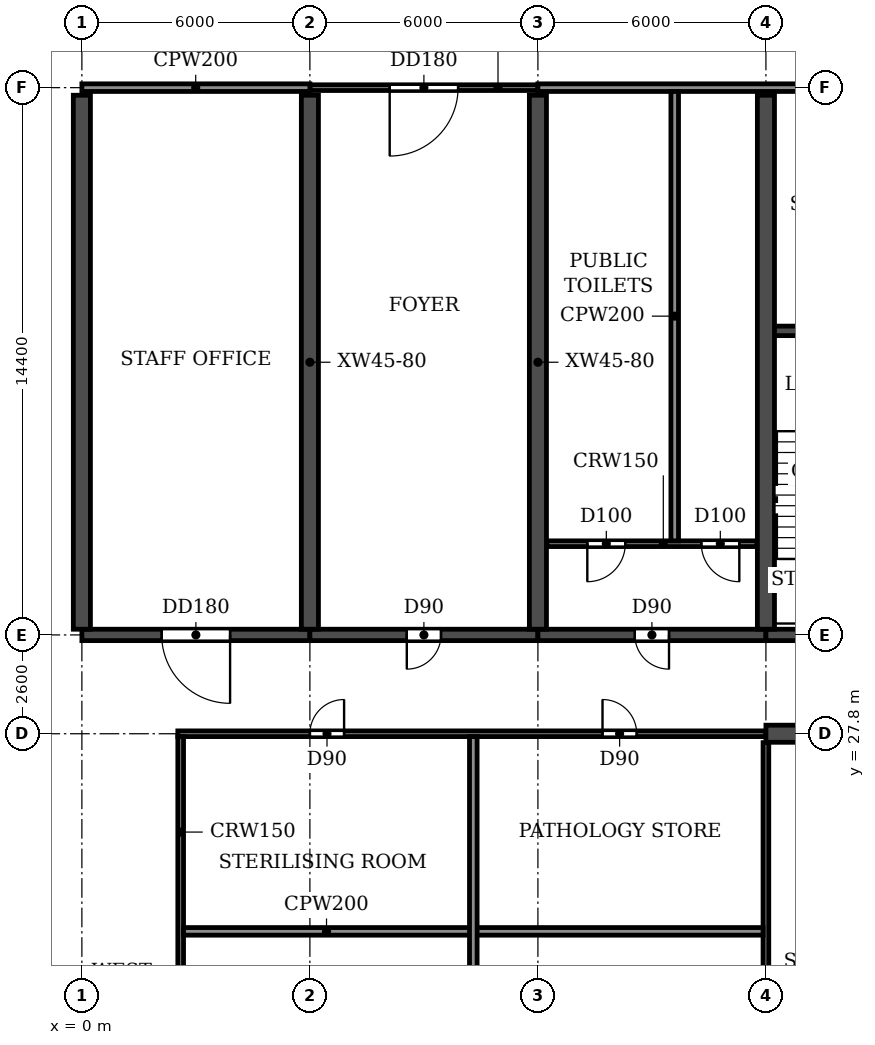
"""IFC4 building model, lengths in metres.
Left out: names, types, materials, properties, quantities, classifications, styles, units other than length and angle.
Written with IfcOpenShell. Run it as: python <this file> out.ifc"""

import sys

from ifc_helpers import new_model, si_unit, direction, frame, frame_2d, origin, place, context, subcontext, project, spatial, rectangle, extrude, element, fill, save


model = new_model("IFC4")
c1 = context("Model", 3, precision=1e-05, world=origin(), true_north=direction((0.0, 1.0)))
c2 = subcontext(c1, "Body", "Model", "MODEL_VIEW")
j1 = project(units=[si_unit("LENGTHUNIT", "METRE"), si_unit("PLANEANGLEUNIT", "RADIAN")], contexts=[c1])
p1 = place(None, origin())
s1 = spatial("IfcSite", under=j1, at=p1, CompositionType="ELEMENT")
p2 = place(p1, origin())
s2 = spatial("IfcBuilding", under=s1, at=p2, CompositionType="ELEMENT")
p3 = place(p2, frame((0.0, 0.0, 6.0)))
s3 = spatial("IfcBuildingStorey", under=s2, at=p3, CompositionType="ELEMENT", Elevation=6.0)
for number, where, z_axis, x_axis in (
    (1, (0.0, 30.55, 0.0), (0.0, 0.0, 1.0), (0.0, 1.0, 0.0)),
    (2, (6.0, 30.55, 0.0), (0.0, 0.0, 1.0), (0.0, 1.0, 0.0)),
    (3, (12.0, 30.55, 0.0), (0.0, 0.0, 1.0), (0.0, 1.0, 0.0)),
    (4, (18.0, 30.55, 0.0), (0.0, 0.0, 1.0), (0.0, 1.0, 0.0)),
):
    element("IfcWall", number, at=place(p3, frame(where, z_axis=z_axis, x_axis=x_axis)), inside=s3, PredefinedType="SHEAR", context=c2, shape_type="SweptSolid", body=[
        extrude(rectangle(XDim=14.05, YDim=0.45, at=frame_2d((7.025, 0.0))), origin(), (0.0, 0.0, 1.0), 4.52),
    ])
p4 = place(p3, frame((0.0, 30.4, 0.0), z_axis=(0.0, 0.0, 1.0), x_axis=(1.0, 0.0, 0.0)))
e5 = element("IfcWall", 5, at=p4, inside=s3, PredefinedType="SHEAR", context=c2, shape_type="SweptSolid", body=[
    extrude(rectangle(XDim=6.0, YDim=0.3, at=frame_2d((3.0, 0.0))), origin(), (0.0, 0.0, 1.0), 3.92),
])
p5 = place(p4, frame((2.1, 0.0, 0.0)))
e6 = element("IfcOpeningElement", 6, at=p5, cuts=e5, PredefinedType="OPENING", context=c2, shape_type="SweptSolid", body=[
    extrude(rectangle(XDim=1.8, YDim=2.1, at=frame_2d((0.9, 1.05))), frame((0.0, 0.16, 0.0), z_axis=(0.0, -1.0, 0.0), x_axis=(1.0, 0.0, 0.0)), (0.0, 0.0, 1.0), 0.32),
])
p6 = place(p3, frame((6.0, 30.4, 0.0), z_axis=(0.0, 0.0, 1.0), x_axis=(1.0, 0.0, 0.0)))
e7 = element("IfcWall", 7, at=p6, inside=s3, PredefinedType="SHEAR", context=c2, shape_type="SweptSolid", body=[
    extrude(rectangle(XDim=6.0, YDim=0.3, at=frame_2d((3.0, 0.0))), origin(), (0.0, 0.0, 1.0), 3.92),
])
p7 = place(p6, frame((2.55, 0.0, 0.0)))
e8 = element("IfcOpeningElement", 8, at=p7, cuts=e7, PredefinedType="OPENING", context=c2, shape_type="SweptSolid", body=[
    extrude(rectangle(XDim=0.9, YDim=2.1, at=frame_2d((0.45, 1.05))), frame((0.0, 0.16, 0.0), z_axis=(0.0, -1.0, 0.0), x_axis=(1.0, 0.0, 0.0)), (0.0, 0.0, 1.0), 0.32),
])
p8 = place(p3, frame((12.0, 30.4, 0.0), z_axis=(0.0, 0.0, 1.0), x_axis=(1.0, 0.0, 0.0)))
e9 = element("IfcWall", 9, at=p8, inside=s3, PredefinedType="SHEAR", context=c2, shape_type="SweptSolid", body=[
    extrude(rectangle(XDim=6.0, YDim=0.3, at=frame_2d((3.0, 0.0))), origin(), (0.0, 0.0, 1.0), 3.92),
])
p9 = place(p8, frame((2.55, 0.0, 0.0)))
e10 = element("IfcOpeningElement", 10, at=p9, cuts=e9, PredefinedType="OPENING", context=c2, shape_type="SweptSolid", body=[
    extrude(rectangle(XDim=0.9, YDim=2.1, at=frame_2d((0.45, 1.05))), frame((0.0, 0.16, 0.0), z_axis=(0.0, -1.0, 0.0), x_axis=(1.0, 0.0, 0.0)), (0.0, 0.0, 1.0), 0.32),
])
p10 = place(p3, frame((18.0, 30.4, 0.0), z_axis=(0.0, 0.0, 1.0), x_axis=(1.0, 0.0, 0.0)))
e11 = element("IfcWall", 11, at=p10, inside=s3, PredefinedType="SHEAR", context=c2, shape_type="SweptSolid", body=[
    extrude(rectangle(XDim=6.0, YDim=0.3, at=frame_2d((3.0, 0.0))), origin(), (0.0, 0.0, 1.0), 3.92),
])
p11 = place(p10, frame((1.4, 0.0, 0.0)))
e12 = element("IfcOpeningElement", 12, at=p11, cuts=e11, PredefinedType="OPENING", context=c2, shape_type="SweptSolid", body=[
    extrude(rectangle(XDim=1.0, YDim=2.1, at=frame_2d((0.5, 1.05))), frame((0.0, 0.16, 0.0), z_axis=(0.0, -1.0, 0.0), x_axis=(1.0, 0.0, 0.0)), (0.0, 0.0, 1.0), 0.32),
])
p12 = place(p10, frame((4.45, 0.0, 0.0)))
e13 = element("IfcOpeningElement", 13, at=p12, cuts=e11, PredefinedType="OPENING", context=c2, shape_type="SweptSolid", body=[
    extrude(rectangle(XDim=0.9, YDim=2.1, at=frame_2d((0.45, 1.05))), frame((0.0, 0.16, 0.0), z_axis=(0.0, -1.0, 0.0), x_axis=(1.0, 0.0, 0.0)), (0.0, 0.0, 1.0), 0.32),
])
p13 = place(p3, frame((18.0, 27.8, 0.0), z_axis=(0.0, 0.0, 1.0), x_axis=(1.0, 0.0, 0.0)))
e14 = element("IfcWall", 14, at=p13, inside=s3, PredefinedType="SOLIDWALL", context=c2, shape_type="SweptSolid", body=[
    extrude(rectangle(XDim=66.0, YDim=0.45, at=frame_2d((33.0, 0.0))), origin(), (0.0, 0.0, 1.0), 4.52),
])
p14 = place(p13, frame((0.9, 0.0, 0.0)))
e15 = element("IfcOpeningElement", 15, at=p14, cuts=e14, PredefinedType="OPENING", context=c2, shape_type="SweptSolid", body=[
    extrude(rectangle(XDim=1.0, YDim=2.1, at=frame_2d((0.5, 1.05))), frame((0.0, 0.235, 0.0), z_axis=(0.0, -1.0, 0.0), x_axis=(1.0, 0.0, 0.0)), (0.0, 0.0, 1.0), 0.47),
])
p15 = place(p13, frame((4.25, 0.0, 0.0)))
e16 = element("IfcOpeningElement", 16, at=p15, cuts=e14, PredefinedType="OPENING", context=c2, shape_type="SweptSolid", body=[
    extrude(rectangle(XDim=0.9, YDim=2.1, at=frame_2d((0.45, 1.05))), frame((0.0, 0.235, 0.0), z_axis=(0.0, -1.0, 0.0), x_axis=(1.0, 0.0, 0.0)), (0.0, 0.0, 1.0), 0.47),
])
p16 = place(p13, frame((8.85, 0.0, 0.0)))
e17 = element("IfcOpeningElement", 17, at=p16, cuts=e14, PredefinedType="OPENING", context=c2, shape_type="SweptSolid", body=[
    extrude(rectangle(XDim=0.9, YDim=2.1, at=frame_2d((0.45, 1.05))), frame((0.0, 0.235, 0.0), z_axis=(0.0, -1.0, 0.0), x_axis=(1.0, 0.0, 0.0)), (0.0, 0.0, 1.0), 0.47),
])
p17 = place(p13, frame((13.45, 0.0, 0.0)))
e18 = element("IfcOpeningElement", 18, at=p17, cuts=e14, PredefinedType="OPENING", context=c2, shape_type="SweptSolid", body=[
    extrude(rectangle(XDim=0.9, YDim=2.1, at=frame_2d((0.45, 1.05))), frame((0.0, 0.235, 0.0), z_axis=(0.0, -1.0, 0.0), x_axis=(1.0, 0.0, 0.0)), (0.0, 0.0, 1.0), 0.47),
])
p18 = place(p13, frame((17.9, 0.0, 0.0)))
e19 = element("IfcOpeningElement", 19, at=p18, cuts=e14, PredefinedType="OPENING", context=c2, shape_type="SweptSolid", body=[
    extrude(rectangle(XDim=1.0, YDim=2.1, at=frame_2d((0.5, 1.05))), frame((0.0, 0.235, 0.0), z_axis=(0.0, -1.0, 0.0), x_axis=(1.0, 0.0, 0.0)), (0.0, 0.0, 1.0), 0.47),
])
p19 = place(p13, frame((23.1, 0.0, 0.0)))
e20 = element("IfcOpeningElement", 20, at=p19, cuts=e14, PredefinedType="OPENING", context=c2, shape_type="SweptSolid", body=[
    extrude(rectangle(XDim=1.0, YDim=2.1, at=frame_2d((0.5, 1.05))), frame((0.0, 0.235, 0.0), z_axis=(0.0, -1.0, 0.0), x_axis=(1.0, 0.0, 0.0)), (0.0, 0.0, 1.0), 0.47),
])
p20 = place(p13, frame((29.6, 0.0, 0.0)))
e21 = element("IfcOpeningElement", 21, at=p20, cuts=e14, PredefinedType="OPENING", context=c2, shape_type="SweptSolid", body=[
    extrude(rectangle(XDim=1.0, YDim=2.1, at=frame_2d((0.5, 1.05))), frame((0.0, 0.235, 0.0), z_axis=(0.0, -1.0, 0.0), x_axis=(1.0, 0.0, 0.0)), (0.0, 0.0, 1.0), 0.47),
])
p21 = place(p13, frame((32.5, 0.0, 0.0)))
e22 = element("IfcOpeningElement", 22, at=p21, cuts=e14, PredefinedType="OPENING", context=c2, shape_type="SweptSolid", body=[
    extrude(rectangle(XDim=1.0, YDim=2.1, at=frame_2d((0.5, 1.05))), frame((0.0, 0.235, 0.0), z_axis=(0.0, -1.0, 0.0), x_axis=(1.0, 0.0, 0.0)), (0.0, 0.0, 1.0), 0.47),
])
p22 = place(p13, frame((38.0, 0.0, 0.0)))
e23 = element("IfcOpeningElement", 23, at=p22, cuts=e14, PredefinedType="OPENING", context=c2, shape_type="SweptSolid", body=[
    extrude(rectangle(XDim=1.0, YDim=2.1, at=frame_2d((0.5, 1.05))), frame((0.0, 0.235, 0.0), z_axis=(0.0, -1.0, 0.0), x_axis=(1.0, 0.0, 0.0)), (0.0, 0.0, 1.0), 0.47),
])
p23 = place(p13, frame((43.2, 0.0, 0.0)))
e24 = element("IfcOpeningElement", 24, at=p23, cuts=e14, PredefinedType="OPENING", context=c2, shape_type="SweptSolid", body=[
    extrude(rectangle(XDim=1.0, YDim=2.1, at=frame_2d((0.5, 1.05))), frame((0.0, 0.235, 0.0), z_axis=(0.0, -1.0, 0.0), x_axis=(1.0, 0.0, 0.0)), (0.0, 0.0, 1.0), 0.47),
])
p24 = place(p13, frame((45.8, 0.0, 0.0)))
e25 = element("IfcOpeningElement", 25, at=p24, cuts=e14, PredefinedType="OPENING", context=c2, shape_type="SweptSolid", body=[
    extrude(rectangle(XDim=1.0, YDim=2.1, at=frame_2d((0.5, 1.05))), frame((0.0, 0.235, 0.0), z_axis=(0.0, -1.0, 0.0), x_axis=(1.0, 0.0, 0.0)), (0.0, 0.0, 1.0), 0.47),
])
p25 = place(p13, frame((48.4, 0.0, 0.0)))
e26 = element("IfcOpeningElement", 26, at=p25, cuts=e14, PredefinedType="OPENING", context=c2, shape_type="SweptSolid", body=[
    extrude(rectangle(XDim=1.0, YDim=2.1, at=frame_2d((0.5, 1.05))), frame((0.0, 0.235, 0.0), z_axis=(0.0, -1.0, 0.0), x_axis=(1.0, 0.0, 0.0)), (0.0, 0.0, 1.0), 0.47),
])
p26 = place(p13, frame((51.65, 0.0, 0.0)))
e27 = element("IfcOpeningElement", 27, at=p26, cuts=e14, PredefinedType="OPENING", context=c2, shape_type="SweptSolid", body=[
    extrude(rectangle(XDim=0.9, YDim=2.1, at=frame_2d((0.45, 1.05))), frame((0.0, 0.235, 0.0), z_axis=(0.0, -1.0, 0.0), x_axis=(1.0, 0.0, 0.0)), (0.0, 0.0, 1.0), 0.47),
])
p27 = place(p13, frame((56.25, 0.0, 0.0)))
e28 = element("IfcOpeningElement", 28, at=p27, cuts=e14, PredefinedType="OPENING", context=c2, shape_type="SweptSolid", body=[
    extrude(rectangle(XDim=0.9, YDim=2.1, at=frame_2d((0.45, 1.05))), frame((0.0, 0.235, 0.0), z_axis=(0.0, -1.0, 0.0), x_axis=(1.0, 0.0, 0.0)), (0.0, 0.0, 1.0), 0.47),
])
p28 = place(p13, frame((60.85, 0.0, 0.0)))
e29 = element("IfcOpeningElement", 29, at=p28, cuts=e14, PredefinedType="OPENING", context=c2, shape_type="SweptSolid", body=[
    extrude(rectangle(XDim=0.9, YDim=2.1, at=frame_2d((0.45, 1.05))), frame((0.0, 0.235, 0.0), z_axis=(0.0, -1.0, 0.0), x_axis=(1.0, 0.0, 0.0)), (0.0, 0.0, 1.0), 0.47),
])
p29 = place(p13, frame((64.1, 0.0, 0.0)))
e30 = element("IfcOpeningElement", 30, at=p29, cuts=e14, PredefinedType="OPENING", context=c2, shape_type="SweptSolid", body=[
    extrude(rectangle(XDim=1.0, YDim=2.1, at=frame_2d((0.5, 1.05))), frame((0.0, 0.235, 0.0), z_axis=(0.0, -1.0, 0.0), x_axis=(1.0, 0.0, 0.0)), (0.0, 0.0, 1.0), 0.47),
])
p30 = place(p3, frame((18.0, 38.4, 0.0), z_axis=(0.0, 0.0, 1.0), x_axis=(1.0, 0.0, 0.0)))
e31 = element("IfcWall", 31, at=p30, inside=s3, PredefinedType="SOLIDWALL", context=c2, shape_type="SweptSolid", body=[
    extrude(rectangle(XDim=3.925, YDim=0.25, at=frame_2d((1.962, 0.0))), origin(), (0.0, 0.0, 1.0), 4.52),
])
p31 = place(p3, frame((2.525, 27.8, 0.0), z_axis=(0.0, 0.0, 1.0), x_axis=(1.0, 0.0, 0.0)))
e32 = element("IfcWall", 32, at=p31, inside=s3, PredefinedType="PARTITIONING", context=c2, shape_type="SweptSolid", body=[
    extrude(rectangle(XDim=15.465, YDim=0.15, at=frame_2d((7.732, 0.0))), origin(), (0.0, 0.0, 1.0), 4.52),
])
p32 = place(p31, frame((3.475, 0.0, 0.0)))
e33 = element("IfcOpeningElement", 33, at=p32, cuts=e32, PredefinedType="OPENING", context=c2, shape_type="SweptSolid", body=[
    extrude(rectangle(XDim=0.9, YDim=2.1, at=frame_2d((0.45, 1.05))), frame((0.0, 0.085, 0.0), z_axis=(0.0, -1.0, 0.0), x_axis=(1.0, 0.0, 0.0)), (0.0, 0.0, 1.0), 0.17),
])
p33 = place(p31, frame((11.175, 0.0, 0.0)))
e34 = element("IfcOpeningElement", 34, at=p33, cuts=e32, PredefinedType="OPENING", context=c2, shape_type="SweptSolid", body=[
    extrude(rectangle(XDim=0.9, YDim=2.1, at=frame_2d((0.45, 1.05))), frame((0.0, 0.085, 0.0), z_axis=(0.0, -1.0, 0.0), x_axis=(1.0, 0.0, 0.0)), (0.0, 0.0, 1.0), 0.17),
])
p34 = place(p3, frame((12.235, 32.8, 0.0), z_axis=(0.0, 0.0, 1.0), x_axis=(1.0, 0.0, 0.0)))
e35 = element("IfcWall", 35, at=p34, inside=s3, PredefinedType="PARTITIONING", context=c2, shape_type="SweptSolid", body=[
    extrude(rectangle(XDim=5.53, YDim=0.15, at=frame_2d((2.765, 0.0))), origin(), (0.0, 0.0, 1.0), 4.52),
])
p35 = place(p34, frame((1.065, 0.0, 0.0)))
e36 = element("IfcOpeningElement", 36, at=p35, cuts=e35, PredefinedType="OPENING", context=c2, shape_type="SweptSolid", body=[
    extrude(rectangle(XDim=1.0, YDim=2.1, at=frame_2d((0.5, 1.05))), frame((0.0, 0.085, 0.0), z_axis=(0.0, -1.0, 0.0), x_axis=(1.0, 0.0, 0.0)), (0.0, 0.0, 1.0), 0.17),
])
p36 = place(p34, frame((4.065, 0.0, 0.0)))
e37 = element("IfcOpeningElement", 37, at=p36, cuts=e35, PredefinedType="OPENING", context=c2, shape_type="SweptSolid", body=[
    extrude(rectangle(XDim=1.0, YDim=2.1, at=frame_2d((0.5, 1.05))), frame((0.0, 0.085, 0.0), z_axis=(0.0, -1.0, 0.0), x_axis=(1.0, 0.0, 0.0)), (0.0, 0.0, 1.0), 0.17),
])
p37 = place(p3, frame((6.0, 44.8, 0.0), z_axis=(0.0, 0.0, 1.0), x_axis=(1.0, 0.0, 0.0)))
e38 = element("IfcWall", 38, at=p37, inside=s3, PredefinedType="PARTITIONING", context=c2, shape_type="SweptSolid", body=[
    extrude(rectangle(XDim=6.0, YDim=0.15, at=frame_2d((3.0, 0.0))), origin(), (0.0, 0.0, 1.0), 4.52),
])
p38 = place(p37, frame((2.1, 0.0, 0.0)))
e39 = element("IfcOpeningElement", 39, at=p38, cuts=e38, PredefinedType="OPENING", context=c2, shape_type="SweptSolid", body=[
    extrude(rectangle(XDim=1.8, YDim=2.1, at=frame_2d((0.9, 1.05))), frame((0.0, 0.085, 0.0), z_axis=(0.0, -1.0, 0.0), x_axis=(1.0, 0.0, 0.0)), (0.0, 0.0, 1.0), 0.17),
])
p39 = place(p3, frame((2.6, 14.675, 0.0), z_axis=(0.0, 0.0, 1.0), x_axis=(0.0, 1.0, 0.0)))
e40 = element("IfcWall", 40, at=p39, inside=s3, PredefinedType="PARTITIONING", context=c2, shape_type="SweptSolid", body=[
    extrude(rectangle(XDim=13.05, YDim=0.15, at=frame_2d((6.525, 0.0))), origin(), (0.0, 0.0, 1.0), 4.52),
])
p40 = place(p39, frame((3.025, 0.0, 0.0)))
e41 = element("IfcOpeningElement", 41, at=p40, cuts=e40, PredefinedType="OPENING", context=c2, shape_type="SweptSolid", body=[
    extrude(rectangle(XDim=1.8, YDim=2.1, at=frame_2d((0.9, 1.05))), frame((0.0, 0.085, 0.0), z_axis=(0.0, -1.0, 0.0), x_axis=(1.0, 0.0, 0.0)), (0.0, 0.0, 1.0), 0.17),
])
p41 = place(p3, frame((18.0, 14.835, 0.0), z_axis=(0.0, 0.0, 1.0), x_axis=(0.0, 1.0, 0.0)))
e42 = element("IfcWall", 42, at=p41, inside=s3, PredefinedType="PARTITIONING", context=c2, shape_type="SweptSolid", body=[
    extrude(rectangle(XDim=12.73, YDim=0.15, at=frame_2d((6.365, 0.0))), origin(), (0.0, 0.0, 1.0), 4.52),
])
p42 = place(p3, frame((2.675, 22.6, 0.0), z_axis=(0.0, 0.0, 1.0), x_axis=(1.0, 0.0, 0.0)))
e43 = element("IfcWall", 43, at=p42, inside=s3, PredefinedType="PARTITIONING", context=c2, shape_type="SweptSolid", body=[
    extrude(rectangle(XDim=15.25, YDim=0.2, at=frame_2d((7.625, 0.0))), origin(), (0.0, 0.0, 1.0), 4.52),
])
p43 = place(p3, frame((0.0, 44.8, 0.0), z_axis=(0.0, 0.0, 1.0), x_axis=(1.0, 0.0, 0.0)))
e44 = element("IfcWall", 44, at=p43, inside=s3, PredefinedType="PARTITIONING", context=c2, shape_type="SweptSolid", body=[
    extrude(rectangle(XDim=6.0, YDim=0.2, at=frame_2d((3.0, 0.0))), origin(), (0.0, 0.0, 1.0), 4.52),
])
p44 = place(p3, frame((12.0, 44.8, 0.0), z_axis=(0.0, 0.0, 1.0), x_axis=(1.0, 0.0, 0.0)))
e45 = element("IfcWall", 45, at=p44, inside=s3, PredefinedType="PARTITIONING", context=c2, shape_type="SweptSolid", body=[
    extrude(rectangle(XDim=18.0, YDim=0.2, at=frame_2d((9.0, 0.0))), origin(), (0.0, 0.0, 1.0), 4.52),
])
p45 = place(p3, frame((10.3, 14.675, 0.0), z_axis=(0.0, 0.0, 1.0), x_axis=(0.0, 1.0, 0.0)))
e46 = element("IfcWall", 46, at=p45, inside=s3, PredefinedType="PARTITIONING", context=c2, shape_type="SweptSolid", body=[
    extrude(rectangle(XDim=13.05, YDim=0.2, at=frame_2d((6.525, 0.0))), origin(), (0.0, 0.0, 1.0), 4.52),
])
p46 = place(p3, frame((15.6, 32.875, 0.0), z_axis=(0.0, 0.0, 1.0), x_axis=(0.0, 1.0, 0.0)))
e47 = element("IfcWall", 47, at=p46, inside=s3, PredefinedType="PARTITIONING", context=c2, shape_type="SweptSolid", body=[
    extrude(rectangle(XDim=11.825, YDim=0.2, at=frame_2d((5.913, 0.0))), origin(), (0.0, 0.0, 1.0), 4.52),
])
p47 = place(p5, frame((1.8, 0.0, 0.0), z_axis=(0.0, 0.0, 1.0), x_axis=(-1.0, 0.0, 0.0)))
e48 = element("IfcDoor", 48, at=p47, inside=s3, OperationType="DOUBLE_DOOR_SINGLE_SWING", PredefinedType="DOOR", context=c2, shape_type="SweptSolid", body=[
    extrude(rectangle(XDim=1.8, YDim=2.1, at=frame_2d((0.9, 1.05))), frame((0.0, 0.025, 0.0), z_axis=(0.0, -1.0, 0.0), x_axis=(1.0, 0.0, 0.0)), (0.0, 0.0, 1.0), 0.05),
])
fill(e6, e48)
p48 = place(p32, origin())
e49 = element("IfcDoor", 49, at=p48, inside=s3, OperationType="SINGLE_SWING_RIGHT", PredefinedType="DOOR", context=c2, shape_type="SweptSolid", body=[
    extrude(rectangle(XDim=0.9, YDim=2.1, at=frame_2d((0.45, 1.05))), frame((0.0, 0.025, 0.0), z_axis=(0.0, -1.0, 0.0), x_axis=(1.0, 0.0, 0.0)), (0.0, 0.0, 1.0), 0.05),
])
fill(e33, e49)
p49 = place(p7, frame((0.9, 0.0, 0.0), z_axis=(0.0, 0.0, 1.0), x_axis=(-1.0, 0.0, 0.0)))
e50 = element("IfcDoor", 50, at=p49, inside=s3, OperationType="SINGLE_SWING_RIGHT", PredefinedType="DOOR", context=c2, shape_type="SweptSolid", body=[
    extrude(rectangle(XDim=0.9, YDim=2.1, at=frame_2d((0.45, 1.05))), frame((0.0, 0.025, 0.0), z_axis=(0.0, -1.0, 0.0), x_axis=(1.0, 0.0, 0.0)), (0.0, 0.0, 1.0), 0.05),
])
fill(e8, e50)
p50 = place(p33, origin())
e51 = element("IfcDoor", 51, at=p50, inside=s3, OperationType="SINGLE_SWING_LEFT", PredefinedType="DOOR", context=c2, shape_type="SweptSolid", body=[
    extrude(rectangle(XDim=0.9, YDim=2.1, at=frame_2d((0.45, 1.05))), frame((0.0, 0.025, 0.0), z_axis=(0.0, -1.0, 0.0), x_axis=(1.0, 0.0, 0.0)), (0.0, 0.0, 1.0), 0.05),
])
fill(e34, e51)
p51 = place(p9, frame((0.9, 0.0, 0.0), z_axis=(0.0, 0.0, 1.0), x_axis=(-1.0, 0.0, 0.0)))
e52 = element("IfcDoor", 52, at=p51, inside=s3, OperationType="SINGLE_SWING_LEFT", PredefinedType="DOOR", context=c2, shape_type="SweptSolid", body=[
    extrude(rectangle(XDim=0.9, YDim=2.1, at=frame_2d((0.45, 1.05))), frame((0.0, 0.025, 0.0), z_axis=(0.0, -1.0, 0.0), x_axis=(1.0, 0.0, 0.0)), (0.0, 0.0, 1.0), 0.05),
])
fill(e10, e52)
p52 = place(p35, frame((1.0, 0.0, 0.0), z_axis=(0.0, 0.0, 1.0), x_axis=(-1.0, 0.0, 0.0)))
e53 = element("IfcDoor", 53, at=p52, inside=s3, OperationType="SINGLE_SWING_RIGHT", PredefinedType="DOOR", context=c2, shape_type="SweptSolid", body=[
    extrude(rectangle(XDim=1.0, YDim=2.1, at=frame_2d((0.5, 1.05))), frame((0.0, 0.025, 0.0), z_axis=(0.0, -1.0, 0.0), x_axis=(1.0, 0.0, 0.0)), (0.0, 0.0, 1.0), 0.05),
])
fill(e36, e53)
p53 = place(p36, frame((1.0, 0.0, 0.0), z_axis=(0.0, 0.0, 1.0), x_axis=(-1.0, 0.0, 0.0)))
e54 = element("IfcDoor", 54, at=p53, inside=s3, OperationType="SINGLE_SWING_LEFT", PredefinedType="DOOR", context=c2, shape_type="SweptSolid", body=[
    extrude(rectangle(XDim=1.0, YDim=2.1, at=frame_2d((0.5, 1.05))), frame((0.0, 0.025, 0.0), z_axis=(0.0, -1.0, 0.0), x_axis=(1.0, 0.0, 0.0)), (0.0, 0.0, 1.0), 0.05),
])
fill(e37, e54)
p54 = place(p38, frame((1.8, 0.0, 0.0), z_axis=(0.0, 0.0, 1.0), x_axis=(-1.0, 0.0, 0.0)))
e55 = element("IfcDoor", 55, at=p54, inside=s3, OperationType="DOUBLE_DOOR_SINGLE_SWING", PredefinedType="DOOR", context=c2, shape_type="SweptSolid", body=[
    extrude(rectangle(XDim=1.8, YDim=2.1, at=frame_2d((0.9, 1.05))), frame((0.0, 0.025, 0.0), z_axis=(0.0, -1.0, 0.0), x_axis=(1.0, 0.0, 0.0)), (0.0, 0.0, 1.0), 0.05),
])
fill(e39, e55)
save(model, sys.argv[1])
